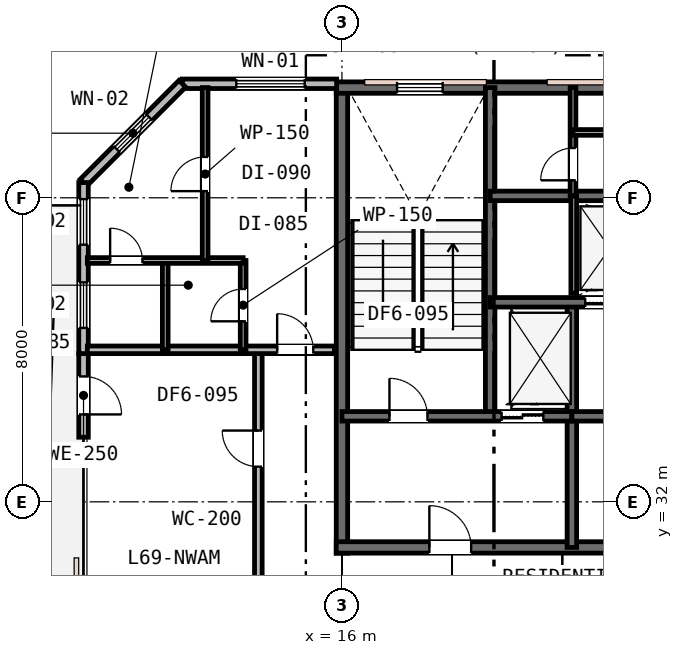
"""IFC4 building model, lengths in metres.
Left out: names, types, materials, properties, quantities, classifications, styles, units other than length and angle.
Written with IfcOpenShell. Run it as: python <this file> out.ifc"""

import sys

from ifc_helpers import new_model, si_unit, direction, frame, frame_2d, origin, place, context, subcontext, project, spatial, rectangle, extrude, element, fill, save


model = new_model("IFC4")
c1 = context("Model", 3, precision=1e-05, world=origin(), true_north=direction((0.0, 1.0)))
c2 = subcontext(c1, "Body", "Model", "MODEL_VIEW")
j1 = project(units=[si_unit("LENGTHUNIT", "METRE"), si_unit("PLANEANGLEUNIT", "RADIAN")], contexts=[c1])
p1 = place(None, origin())
s1 = spatial("IfcSite", under=j1, at=p1, CompositionType="ELEMENT")
p2 = place(p1, origin())
s2 = spatial("IfcBuilding", under=s1, at=p2, CompositionType="ELEMENT")
p3 = place(p2, frame((0.0, 0.0, 267.8)))
s3 = spatial("IfcBuildingStorey", under=s2, at=p3, CompositionType="ELEMENT", Elevation=267.8)
p4 = place(p3, frame((16.0, 30.65, 0.0), z_axis=(0.0, 0.0, 1.0), x_axis=(0.0, 1.0, 0.0)))
e1 = element("IfcWall", 1, at=p4, inside=s3, PredefinedType="SHEAR", context=c2, shape_type="SweptSolid", body=[
    extrude(rectangle(XDim=12.3, YDim=0.3, at=frame_2d((6.15, 0.0))), origin(), (0.0, 0.0, 1.0), 3.8),
])
p5 = place(p3, frame((15.85, 42.9, 0.0), z_axis=(0.0, 0.0, 1.0), x_axis=(1.0, 0.0, 0.0)))
e2 = element("IfcWall", 2, at=p5, inside=s3, PredefinedType="SHEAR", context=c2, shape_type="SweptSolid", body=[
    extrude(rectangle(XDim=24.3, YDim=0.3, at=frame_2d((12.15, 0.0))), origin(), (0.0, 0.0, 1.0), 3.8),
])
p6 = place(p5, frame((1.6, 0.0, 0.95)))
e3 = element("IfcOpeningElement", 3, at=p6, cuts=e2, PredefinedType="OPENING", context=c2, shape_type="SweptSolid", body=[
    extrude(rectangle(XDim=1.2, YDim=1.6, at=frame_2d((0.6, 0.8))), frame((0.0, 0.16, 0.0), z_axis=(0.0, -1.0, 0.0), x_axis=(1.0, 0.0, 0.0)), (0.0, 0.0, 1.0), 0.32),
])
p7 = place(p5, frame((16.5, 0.0, 0.95)))
e4 = element("IfcOpeningElement", 4, at=p7, cuts=e2, PredefinedType="OPENING", context=c2, shape_type="SweptSolid", body=[
    extrude(rectangle(XDim=1.2, YDim=1.6, at=frame_2d((0.6, 0.8))), frame((0.0, 0.16, 0.0), z_axis=(0.0, -1.0, 0.0), x_axis=(1.0, 0.0, 0.0)), (0.0, 0.0, 1.0), 0.32),
])
p8 = place(p5, frame((21.6, 0.0, 0.95)))
e5 = element("IfcOpeningElement", 5, at=p8, cuts=e2, PredefinedType="OPENING", context=c2, shape_type="SweptSolid", body=[
    extrude(rectangle(XDim=1.2, YDim=1.6, at=frame_2d((0.6, 0.8))), frame((0.0, 0.16, 0.0), z_axis=(0.0, -1.0, 0.0), x_axis=(1.0, 0.0, 0.0)), (0.0, 0.0, 1.0), 0.32),
])
p9 = place(p3, frame((15.85, 30.8, 0.0), z_axis=(0.0, 0.0, 1.0), x_axis=(1.0, 0.0, 0.0)))
e6 = element("IfcWall", 6, at=p9, inside=s3, PredefinedType="SHEAR", context=c2, shape_type="SweptSolid", body=[
    extrude(rectangle(XDim=11.2, YDim=0.3, at=frame_2d((5.6, 0.0))), origin(), (0.0, 0.0, 1.0), 3.8),
])
p10 = place(p9, frame((2.45, 0.0, 0.0)))
e7 = element("IfcOpeningElement", 7, at=p10, cuts=e6, PredefinedType="OPENING", context=c2, shape_type="SweptSolid", body=[
    extrude(rectangle(XDim=1.1, YDim=2.15, at=frame_2d((0.55, 1.075))), frame((0.0, 0.16, 0.0), z_axis=(0.0, -1.0, 0.0), x_axis=(1.0, 0.0, 0.0)), (0.0, 0.0, 1.0), 0.32),
])
p11 = place(p3, frame((19.9, 34.25, 0.0), z_axis=(0.0, 0.0, 1.0), x_axis=(0.0, 1.0, 0.0)))
e8 = element("IfcWall", 8, at=p11, inside=s3, PredefinedType="SHEAR", context=c2, shape_type="SweptSolid", body=[
    extrude(rectangle(XDim=8.65, YDim=0.25, at=frame_2d((4.325, 0.0))), origin(), (0.0, 0.0, 1.0), 3.8),
])
p12 = place(p3, frame((22.05, 30.8, 0.0), z_axis=(0.0, 0.0, 1.0), x_axis=(0.0, 1.0, 0.0)))
e9 = element("IfcWall", 9, at=p12, inside=s3, PredefinedType="SHEAR", context=c2, shape_type="SweptSolid", body=[
    extrude(rectangle(XDim=6.45, YDim=0.25, at=frame_2d((3.225, 0.0))), origin(), (0.0, 0.0, 1.0), 3.8),
])
p13 = place(p3, frame((16.0, 34.25, 0.0), z_axis=(0.0, 0.0, 1.0), x_axis=(1.0, 0.0, 0.0)))
e10 = element("IfcWall", 10, at=p13, inside=s3, PredefinedType="SHEAR", context=c2, shape_type="SweptSolid", body=[
    extrude(rectangle(XDim=6.05, YDim=0.25, at=frame_2d((3.025, 0.0))), origin(), (0.0, 0.0, 1.0), 3.8),
])
p14 = place(p13, frame((1.25, 0.0, 0.0)))
e11 = element("IfcOpeningElement", 11, at=p14, cuts=e10, PredefinedType="OPENING", context=c2, shape_type="SweptSolid", body=[
    extrude(rectangle(XDim=1.0, YDim=2.15, at=frame_2d((0.5, 1.075))), frame((0.0, 0.135, 0.0), z_axis=(0.0, -1.0, 0.0), x_axis=(1.0, 0.0, 0.0)), (0.0, 0.0, 1.0), 0.27),
])
p15 = place(p13, frame((4.2, 0.0, 0.0)))
e12 = element("IfcOpeningElement", 12, at=p15, cuts=e10, PredefinedType="OPENING", context=c2, shape_type="SweptSolid", body=[
    extrude(rectangle(XDim=1.1, YDim=2.15, at=frame_2d((0.55, 1.075))), frame((0.0, 0.135, 0.0), z_axis=(0.0, -1.0, 0.0), x_axis=(1.0, 0.0, 0.0)), (0.0, 0.0, 1.0), 0.27),
])
p16 = place(p3, frame((22.05, 34.25, 0.0), z_axis=(0.0, 0.0, 1.0), x_axis=(1.0, 0.0, 0.0)))
e13 = element("IfcWall", 13, at=p16, inside=s3, PredefinedType="SHEAR", context=c2, shape_type="SweptSolid", body=[
    extrude(rectangle(XDim=5.0, YDim=0.25, at=frame_2d((2.5, 0.0))), origin(), (0.0, 0.0, 1.0), 3.8),
])
p17 = place(p16, frame((1.95, 0.0, 0.0)))
e14 = element("IfcOpeningElement", 14, at=p17, cuts=e13, PredefinedType="OPENING", context=c2, shape_type="SweptSolid", body=[
    extrude(rectangle(XDim=1.0, YDim=2.15, at=frame_2d((0.5, 1.075))), frame((0.0, 0.135, 0.0), z_axis=(0.0, -1.0, 0.0), x_axis=(1.0, 0.0, 0.0)), (0.0, 0.0, 1.0), 0.27),
])
p18 = place(p3, frame((19.9, 37.25, 0.0), z_axis=(0.0, 0.0, 1.0), x_axis=(1.0, 0.0, 0.0)))
e15 = element("IfcWall", 15, at=p18, inside=s3, PredefinedType="SHEAR", context=c2, shape_type="SweptSolid", body=[
    extrude(rectangle(XDim=16.2, YDim=0.25, at=frame_2d((8.1, 0.0))), origin(), (0.0, 0.0, 1.0), 3.8),
])
p19 = place(p18, frame((12.55, 0.0, 0.0)))
e16 = element("IfcOpeningElement", 16, at=p19, cuts=e15, PredefinedType="OPENING", context=c2, shape_type="SweptSolid", body=[
    extrude(rectangle(XDim=0.9, YDim=2.15, at=frame_2d((0.45, 1.075))), frame((0.0, 0.135, 0.0), z_axis=(0.0, -1.0, 0.0), x_axis=(1.0, 0.0, 0.0)), (0.0, 0.0, 1.0), 0.27),
])
p20 = place(p18, frame((2.5, 0.0, 0.0)))
e17 = element("IfcOpeningElement", 17, at=p20, cuts=e15, PredefinedType="OPENING", context=c2, shape_type="SweptSolid", body=[
    extrude(rectangle(XDim=1.05, YDim=2.15, at=frame_2d((0.525, 1.075))), frame((0.0, 0.135, 0.0), z_axis=(0.0, -1.0, 0.0), x_axis=(1.0, 0.0, 0.0)), (0.0, 0.0, 1.0), 0.27),
])
p21 = place(p18, frame((4.4, 0.0, 0.0)))
e18 = element("IfcOpeningElement", 18, at=p21, cuts=e15, PredefinedType="OPENING", context=c2, shape_type="SweptSolid", body=[
    extrude(rectangle(XDim=1.05, YDim=2.15, at=frame_2d((0.525, 1.075))), frame((0.0, 0.135, 0.0), z_axis=(0.0, -1.0, 0.0), x_axis=(1.0, 0.0, 0.0)), (0.0, 0.0, 1.0), 0.27),
])
p22 = place(p18, frame((6.3, 0.0, 0.0)))
e19 = element("IfcOpeningElement", 19, at=p22, cuts=e15, PredefinedType="OPENING", context=c2, shape_type="SweptSolid", body=[
    extrude(rectangle(XDim=1.05, YDim=2.15, at=frame_2d((0.525, 1.075))), frame((0.0, 0.135, 0.0), z_axis=(0.0, -1.0, 0.0), x_axis=(1.0, 0.0, 0.0)), (0.0, 0.0, 1.0), 0.27),
])
p23 = place(p3, frame((19.9, 40.05, 0.0), z_axis=(0.0, 0.0, 1.0), x_axis=(1.0, 0.0, 0.0)))
e20 = element("IfcWall", 20, at=p23, inside=s3, PredefinedType="SHEAR", context=c2, shape_type="SweptSolid", body=[
    extrude(rectangle(XDim=12.05, YDim=0.25, at=frame_2d((6.025, 0.0))), origin(), (0.0, 0.0, 1.0), 3.8),
])
p24 = place(p3, frame((15.86, 43.0, 0.0), z_axis=(0.0, 0.0, 1.0), x_axis=(-1.0, 0.0, 0.0)))
e21 = element("IfcWall", 21, at=p24, inside=s3, PredefinedType="STANDARD", context=c2, shape_type="SweptSolid", body=[
    extrude(rectangle(XDim=4.06, YDim=0.25, at=frame_2d((2.03, 0.0))), origin(), (0.0, 0.0, 1.0), 3.53),
])
p25 = place(p24, frame((0.84, 0.0, 0.75)))
e22 = element("IfcOpeningElement", 22, at=p25, cuts=e21, PredefinedType="OPENING", context=c2, shape_type="SweptSolid", body=[
    extrude(rectangle(XDim=1.8, YDim=1.85, at=frame_2d((0.9, 0.925))), frame((0.0, 0.135, 0.0), z_axis=(0.0, -1.0, 0.0), x_axis=(1.0, 0.0, 0.0)), (0.0, 0.0, 1.0), 0.27),
])
p26 = place(p3, frame((11.8, 43.0, 0.0), z_axis=(0.0, 0.0, 1.0), x_axis=(-0.707106781187, -0.707106781187, 0.0)))
e23 = element("IfcWall", 23, at=p26, inside=s3, PredefinedType="STANDARD", context=c2, shape_type="SweptSolid", body=[
    extrude(rectangle(XDim=3.677, YDim=0.25, at=frame_2d((1.839, 0.0))), origin(), (0.0, 0.0, 1.0), 3.53),
])
p27 = place(p26, frame((1.238, 0.0, 0.85)))
e24 = element("IfcOpeningElement", 24, at=p27, cuts=e23, PredefinedType="OPENING", context=c2, shape_type="SweptSolid", body=[
    extrude(rectangle(XDim=1.2, YDim=1.6, at=frame_2d((0.6, 0.8))), frame((0.0, 0.135, 0.0), z_axis=(0.0, -1.0, 0.0), x_axis=(1.0, 0.0, 0.0)), (0.0, 0.0, 1.0), 0.27),
])
p28 = place(p3, frame((9.2, 35.9, 0.0), z_axis=(0.0, 0.0, 1.0), x_axis=(0.0, -1.0, 0.0)))
e25 = element("IfcWall", 25, at=p28, inside=s3, PredefinedType="STANDARD", context=c2, shape_type="SweptSolid", body=[
    extrude(rectangle(XDim=2.2, YDim=0.25, at=frame_2d((1.1, 0.0))), origin(), (0.0, 0.0, 1.0), 3.53),
])
p29 = place(p28, frame((0.6, 0.0, 0.0)))
e26 = element("IfcOpeningElement", 26, at=p29, cuts=e25, PredefinedType="OPENING", context=c2, shape_type="SweptSolid", body=[
    extrude(rectangle(XDim=1.0, YDim=2.15, at=frame_2d((0.5, 1.075))), frame((0.0, 0.135, 0.0), z_axis=(0.0, -1.0, 0.0), x_axis=(1.0, 0.0, 0.0)), (0.0, 0.0, 1.0), 0.27),
])
p30 = place(p3, frame((9.2, 40.4, 0.0), z_axis=(0.0, 0.0, 1.0), x_axis=(0.0, -1.0, 0.0)))
e27 = element("IfcWall", 27, at=p30, inside=s3, PredefinedType="STANDARD", context=c2, shape_type="SweptSolid", body=[
    extrude(rectangle(XDim=4.5, YDim=0.25, at=frame_2d((2.25, 0.0))), origin(), (0.0, 0.0, 1.0), 3.53),
])
p31 = place(p30, frame((0.435, 0.0, 0.85)))
e28 = element("IfcOpeningElement", 28, at=p31, cuts=e27, PredefinedType="OPENING", context=c2, shape_type="SweptSolid", body=[
    extrude(rectangle(XDim=1.2, YDim=1.6, at=frame_2d((0.6, 0.8))), frame((0.0, 0.135, 0.0), z_axis=(0.0, -1.0, 0.0), x_axis=(1.0, 0.0, 0.0)), (0.0, 0.0, 1.0), 0.27),
])
p32 = place(p30, frame((2.625, 0.0, 0.85)))
e29 = element("IfcOpeningElement", 29, at=p32, cuts=e27, PredefinedType="OPENING", context=c2, shape_type="SweptSolid", body=[
    extrude(rectangle(XDim=1.2, YDim=1.6, at=frame_2d((0.6, 0.8))), frame((0.0, 0.135, 0.0), z_axis=(0.0, -1.0, 0.0), x_axis=(1.0, 0.0, 0.0)), (0.0, 0.0, 1.0), 0.27),
])
p33 = place(p3, frame((22.1, 37.49, 0.0), z_axis=(0.0, 0.0, 1.0), x_axis=(0.0, 1.0, 0.0)))
e30 = element("IfcWall", 30, at=p33, inside=s3, PredefinedType="PLUMBINGWALL", context=c2, shape_type="SweptSolid", body=[
    extrude(rectangle(XDim=2.56, YDim=0.15, at=frame_2d((1.28, 0.0))), origin(), (0.0, 0.0, 1.0), 3.53),
])
p34 = place(p3, frame((22.08, 40.05, 0.0), z_axis=(0.0, 0.0, 1.0), x_axis=(0.0, 1.0, 0.0)))
e31 = element("IfcWall", 31, at=p34, inside=s3, PredefinedType="PARTITIONING", context=c2, shape_type="SweptSolid", body=[
    extrude(rectangle(XDim=2.85, YDim=0.15, at=frame_2d((1.425, 0.0))), origin(), (0.0, 0.0, 1.0), 3.53),
])
p35 = place(p34, frame((0.41, 0.0, 0.0)))
e32 = element("IfcOpeningElement", 32, at=p35, cuts=e31, PredefinedType="OPENING", context=c2, shape_type="SweptSolid", body=[
    extrude(rectangle(XDim=0.85, YDim=2.15, at=frame_2d((0.425, 1.075))), frame((0.0, 0.085, 0.0), z_axis=(0.0, -1.0, 0.0), x_axis=(1.0, 0.0, 0.0)), (0.0, 0.0, 1.0), 0.17),
])
p36 = place(p3, frame((22.08, 41.72, 0.0), z_axis=(0.0, 0.0, 1.0), x_axis=(1.0, 0.0, 0.0)))
e33 = element("IfcWall", 33, at=p36, inside=s3, PredefinedType="PARTITIONING", context=c2, shape_type="SweptSolid", body=[
    extrude(rectangle(XDim=11.97, YDim=0.15, at=frame_2d((5.985, 0.0))), origin(), (0.0, 0.0, 1.0), 3.53),
])
p37 = place(p36, frame((5.535, 0.0, 0.0)))
e34 = element("IfcOpeningElement", 34, at=p37, cuts=e33, PredefinedType="OPENING", context=c2, shape_type="SweptSolid", body=[
    extrude(rectangle(XDim=0.9, YDim=2.15, at=frame_2d((0.45, 1.075))), frame((0.0, 0.085, 0.0), z_axis=(0.0, -1.0, 0.0), x_axis=(1.0, 0.0, 0.0)), (0.0, 0.0, 1.0), 0.17),
])
p38 = place(p3, frame((13.8, 28.6, 0.0), z_axis=(0.0, 0.0, 1.0), x_axis=(0.0, 1.0, 0.0)))
e35 = element("IfcWall", 35, at=p38, inside=s3, PredefinedType="PARTITIONING", context=c2, shape_type="SweptSolid", body=[
    extrude(rectangle(XDim=7.4, YDim=0.2, at=frame_2d((3.7, 0.0))), origin(), (0.0, 0.0, 1.0), 3.53),
])
p39 = place(p38, frame((4.325, 0.0, 0.0)))
e36 = element("IfcOpeningElement", 36, at=p39, cuts=e35, PredefinedType="OPENING", context=c2, shape_type="SweptSolid", body=[
    extrude(rectangle(XDim=0.95, YDim=2.15, at=frame_2d((0.475, 1.075))), frame((0.0, 0.11, 0.0), z_axis=(0.0, -1.0, 0.0), x_axis=(1.0, 0.0, 0.0)), (0.0, 0.0, 1.0), 0.22),
])
p40 = place(p3, frame((9.3, 36.0, 0.0), z_axis=(0.0, 0.0, 1.0), x_axis=(1.0, 0.0, 0.0)))
e37 = element("IfcWall", 37, at=p40, inside=s3, PredefinedType="PARTITIONING", context=c2, shape_type="SweptSolid", body=[
    extrude(rectangle(XDim=6.5, YDim=0.2, at=frame_2d((3.25, 0.0))), origin(), (0.0, 0.0, 1.0), 3.53),
])
p41 = place(p40, frame((4.995, 0.0, 0.0)))
e38 = element("IfcOpeningElement", 38, at=p41, cuts=e37, PredefinedType="OPENING", context=c2, shape_type="SweptSolid", body=[
    extrude(rectangle(XDim=0.95, YDim=2.15, at=frame_2d((0.475, 1.075))), frame((0.0, 0.11, 0.0), z_axis=(0.0, -1.0, 0.0), x_axis=(1.0, 0.0, 0.0)), (0.0, 0.0, 1.0), 0.22),
])
p42 = place(p3, frame((13.4, 36.0, 0.0), z_axis=(0.0, 0.0, 1.0), x_axis=(0.0, 1.0, 0.0)))
e39 = element("IfcWall", 39, at=p42, inside=s3, PredefinedType="PARTITIONING", context=c2, shape_type="SweptSolid", body=[
    extrude(rectangle(XDim=2.35, YDim=0.15, at=frame_2d((1.175, 0.0))), origin(), (0.0, 0.0, 1.0), 3.53),
])
p43 = place(p42, frame((0.75, 0.0, 0.0)))
e40 = element("IfcOpeningElement", 40, at=p43, cuts=e39, PredefinedType="OPENING", context=c2, shape_type="SweptSolid", body=[
    extrude(rectangle(XDim=0.85, YDim=2.15, at=frame_2d((0.425, 1.075))), frame((0.0, 0.085, 0.0), z_axis=(0.0, -1.0, 0.0), x_axis=(1.0, 0.0, 0.0)), (0.0, 0.0, 1.0), 0.17),
])
p44 = place(p3, frame((11.35, 36.0, 0.0), z_axis=(0.0, 0.0, 1.0), x_axis=(0.0, 1.0, 0.0)))
e41 = element("IfcWall", 41, at=p44, inside=s3, PredefinedType="PARTITIONING", context=c2, shape_type="SweptSolid", body=[
    extrude(rectangle(XDim=2.35, YDim=0.15, at=frame_2d((1.175, 0.0))), origin(), (0.0, 0.0, 1.0), 3.53),
])
p45 = place(p3, frame((9.3, 38.35, 0.0), z_axis=(0.0, 0.0, 1.0), x_axis=(1.0, 0.0, 0.0)))
e42 = element("IfcWall", 42, at=p45, inside=s3, PredefinedType="PARTITIONING", context=c2, shape_type="SweptSolid", body=[
    extrude(rectangle(XDim=4.1, YDim=0.15, at=frame_2d((2.05, 0.0))), origin(), (0.0, 0.0, 1.0), 3.53),
])
p46 = place(p45, frame((0.6, 0.0, 0.0)))
e43 = element("IfcOpeningElement", 43, at=p46, cuts=e42, PredefinedType="OPENING", context=c2, shape_type="SweptSolid", body=[
    extrude(rectangle(XDim=0.85, YDim=2.15, at=frame_2d((0.425, 1.075))), frame((0.0, 0.085, 0.0), z_axis=(0.0, -1.0, 0.0), x_axis=(1.0, 0.0, 0.0)), (0.0, 0.0, 1.0), 0.17),
])
p47 = place(p3, frame((12.4, 38.35, 0.0), z_axis=(0.0, 0.0, 1.0), x_axis=(0.0, 1.0, 0.0)))
e44 = element("IfcWall", 44, at=p47, inside=s3, PredefinedType="PARTITIONING", context=c2, shape_type="SweptSolid", body=[
    extrude(rectangle(XDim=4.55, YDim=0.15, at=frame_2d((2.275, 0.0))), origin(), (0.0, 0.0, 1.0), 3.53),
])
p48 = place(p47, frame((1.825, 0.0, 0.0)))
e45 = element("IfcOpeningElement", 45, at=p48, cuts=e44, PredefinedType="OPENING", context=c2, shape_type="SweptSolid", body=[
    extrude(rectangle(XDim=0.9, YDim=2.15, at=frame_2d((0.45, 1.075))), frame((0.0, 0.085, 0.0), z_axis=(0.0, -1.0, 0.0), x_axis=(1.0, 0.0, 0.0)), (0.0, 0.0, 1.0), 0.17),
])
p49 = place(p6, origin())
e46 = element("IfcWindow", 46, at=p49, inside=s3, PartitioningType="SINGLE_PANEL", PredefinedType="WINDOW", context=c2, shape_type="SweptSolid", body=[
    extrude(rectangle(XDim=1.2, YDim=1.6, at=frame_2d((0.6, 0.8))), frame((0.0, 0.03, 0.0), z_axis=(0.0, -1.0, 0.0), x_axis=(1.0, 0.0, 0.0)), (0.0, 0.0, 1.0), 0.06),
])
fill(e3, e46)
p50 = place(p25, origin())
e47 = element("IfcWindow", 47, at=p50, inside=s3, PartitioningType="SINGLE_PANEL", PredefinedType="WINDOW", context=c2, shape_type="SweptSolid", body=[
    extrude(rectangle(XDim=1.8, YDim=1.85, at=frame_2d((0.9, 0.925))), frame((0.0, 0.03, 0.0), z_axis=(0.0, -1.0, 0.0), x_axis=(1.0, 0.0, 0.0)), (0.0, 0.0, 1.0), 0.06),
])
fill(e22, e47)
p51 = place(p27, origin())
e48 = element("IfcWindow", 48, at=p51, inside=s3, PartitioningType="SINGLE_PANEL", PredefinedType="WINDOW", context=c2, shape_type="SweptSolid", body=[
    extrude(rectangle(XDim=1.2, YDim=1.6, at=frame_2d((0.6, 0.8))), frame((0.0, 0.03, 0.0), z_axis=(0.0, -1.0, 0.0), x_axis=(1.0, 0.0, 0.0)), (0.0, 0.0, 1.0), 0.06),
])
fill(e24, e48)
p52 = place(p29, origin())
e49 = element("IfcDoor", 49, at=p52, inside=s3, OperationType="SINGLE_SWING_RIGHT", PredefinedType="DOOR", context=c2, shape_type="SweptSolid", body=[
    extrude(rectangle(XDim=1.0, YDim=2.15, at=frame_2d((0.5, 1.075))), frame((0.0, 0.025, 0.0), z_axis=(0.0, -1.0, 0.0), x_axis=(1.0, 0.0, 0.0)), (0.0, 0.0, 1.0), 0.05),
])
fill(e26, e49)
p53 = place(p31, origin())
e50 = element("IfcWindow", 50, at=p53, inside=s3, PartitioningType="SINGLE_PANEL", PredefinedType="WINDOW", context=c2, shape_type="SweptSolid", body=[
    extrude(rectangle(XDim=1.2, YDim=1.6, at=frame_2d((0.6, 0.8))), frame((0.0, 0.03, 0.0), z_axis=(0.0, -1.0, 0.0), x_axis=(1.0, 0.0, 0.0)), (0.0, 0.0, 1.0), 0.06),
])
fill(e28, e50)
p54 = place(p32, origin())
e51 = element("IfcWindow", 51, at=p54, inside=s3, PartitioningType="SINGLE_PANEL", PredefinedType="WINDOW", context=c2, shape_type="SweptSolid", body=[
    extrude(rectangle(XDim=1.2, YDim=1.6, at=frame_2d((0.6, 0.8))), frame((0.0, 0.03, 0.0), z_axis=(0.0, -1.0, 0.0), x_axis=(1.0, 0.0, 0.0)), (0.0, 0.0, 1.0), 0.06),
])
fill(e29, e51)
p55 = place(p14, origin())
e52 = element("IfcDoor", 52, at=p55, inside=s3, OperationType="SINGLE_SWING_LEFT", PredefinedType="DOOR", context=c2, shape_type="SweptSolid", body=[
    extrude(rectangle(XDim=1.0, YDim=2.15, at=frame_2d((0.5, 1.075))), frame((0.0, 0.025, 0.0), z_axis=(0.0, -1.0, 0.0), x_axis=(1.0, 0.0, 0.0)), (0.0, 0.0, 1.0), 0.05),
])
fill(e11, e52)
p56 = place(p10, origin())
e53 = element("IfcDoor", 53, at=p56, inside=s3, OperationType="SINGLE_SWING_LEFT", PredefinedType="DOOR", context=c2, shape_type="SweptSolid", body=[
    extrude(rectangle(XDim=1.1, YDim=2.15, at=frame_2d((0.55, 1.075))), frame((0.0, 0.025, 0.0), z_axis=(0.0, -1.0, 0.0), x_axis=(1.0, 0.0, 0.0)), (0.0, 0.0, 1.0), 0.05),
])
fill(e7, e53)
p57 = place(p35, origin())
e54 = element("IfcDoor", 54, at=p57, inside=s3, OperationType="SINGLE_SWING_LEFT", PredefinedType="DOOR", context=c2, shape_type="SweptSolid", body=[
    extrude(rectangle(XDim=0.85, YDim=2.15, at=frame_2d((0.425, 1.075))), frame((0.0, 0.025, 0.0), z_axis=(0.0, -1.0, 0.0), x_axis=(1.0, 0.0, 0.0)), (0.0, 0.0, 1.0), 0.05),
])
fill(e32, e54)
p58 = place(p39, origin())
e55 = element("IfcDoor", 55, at=p58, inside=s3, OperationType="SINGLE_SWING_RIGHT", PredefinedType="DOOR", context=c2, shape_type="SweptSolid", body=[
    extrude(rectangle(XDim=0.95, YDim=2.15, at=frame_2d((0.475, 1.075))), frame((0.0, 0.025, 0.0), z_axis=(0.0, -1.0, 0.0), x_axis=(1.0, 0.0, 0.0)), (0.0, 0.0, 1.0), 0.05),
])
fill(e36, e55)
p59 = place(p41, origin())
e56 = element("IfcDoor", 56, at=p59, inside=s3, OperationType="SINGLE_SWING_LEFT", PredefinedType="DOOR", context=c2, shape_type="SweptSolid", body=[
    extrude(rectangle(XDim=0.95, YDim=2.15, at=frame_2d((0.475, 1.075))), frame((0.0, 0.025, 0.0), z_axis=(0.0, -1.0, 0.0), x_axis=(1.0, 0.0, 0.0)), (0.0, 0.0, 1.0), 0.05),
])
fill(e38, e56)
p60 = place(p43, origin())
e57 = element("IfcDoor", 57, at=p60, inside=s3, OperationType="SINGLE_SWING_LEFT", PredefinedType="DOOR", context=c2, shape_type="SweptSolid", body=[
    extrude(rectangle(XDim=0.85, YDim=2.15, at=frame_2d((0.425, 1.075))), frame((0.0, 0.025, 0.0), z_axis=(0.0, -1.0, 0.0), x_axis=(1.0, 0.0, 0.0)), (0.0, 0.0, 1.0), 0.05),
])
fill(e40, e57)
p61 = place(p46, origin())
e58 = element("IfcDoor", 58, at=p61, inside=s3, OperationType="SINGLE_SWING_LEFT", PredefinedType="DOOR", context=c2, shape_type="SweptSolid", body=[
    extrude(rectangle(XDim=0.85, YDim=2.15, at=frame_2d((0.425, 1.075))), frame((0.0, 0.025, 0.0), z_axis=(0.0, -1.0, 0.0), x_axis=(1.0, 0.0, 0.0)), (0.0, 0.0, 1.0), 0.05),
])
fill(e43, e58)
p62 = place(p48, origin())
e59 = element("IfcDoor", 59, at=p62, inside=s3, OperationType="SINGLE_SWING_LEFT", PredefinedType="DOOR", context=c2, shape_type="SweptSolid", body=[
    extrude(rectangle(XDim=0.9, YDim=2.15, at=frame_2d((0.45, 1.075))), frame((0.0, 0.025, 0.0), z_axis=(0.0, -1.0, 0.0), x_axis=(1.0, 0.0, 0.0)), (0.0, 0.0, 1.0), 0.05),
])
fill(e45, e59)
p63 = place(p15, origin())
e60 = element("IfcDoor", 60, at=p63, inside=s3, OperationType="DOUBLE_DOOR_SLIDING", PredefinedType="DOOR", context=c2, shape_type="SweptSolid", body=[
    extrude(rectangle(XDim=1.1, YDim=2.15, at=frame_2d((0.55, 1.075))), frame((0.0, 0.025, 0.0), z_axis=(0.0, -1.0, 0.0), x_axis=(1.0, 0.0, 0.0)), (0.0, 0.0, 1.0), 0.05),
])
fill(e12, e60)
p64 = place(p20, origin())
e61 = element("IfcDoor", 61, at=p64, inside=s3, OperationType="DOUBLE_DOOR_SLIDING", PredefinedType="DOOR", context=c2, shape_type="SweptSolid", body=[
    extrude(rectangle(XDim=1.05, YDim=2.15, at=frame_2d((0.525, 1.075))), frame((0.0, 0.025, 0.0), z_axis=(0.0, -1.0, 0.0), x_axis=(1.0, 0.0, 0.0)), (0.0, 0.0, 1.0), 0.05),
])
fill(e17, e61)
save(model, sys.argv[1])
